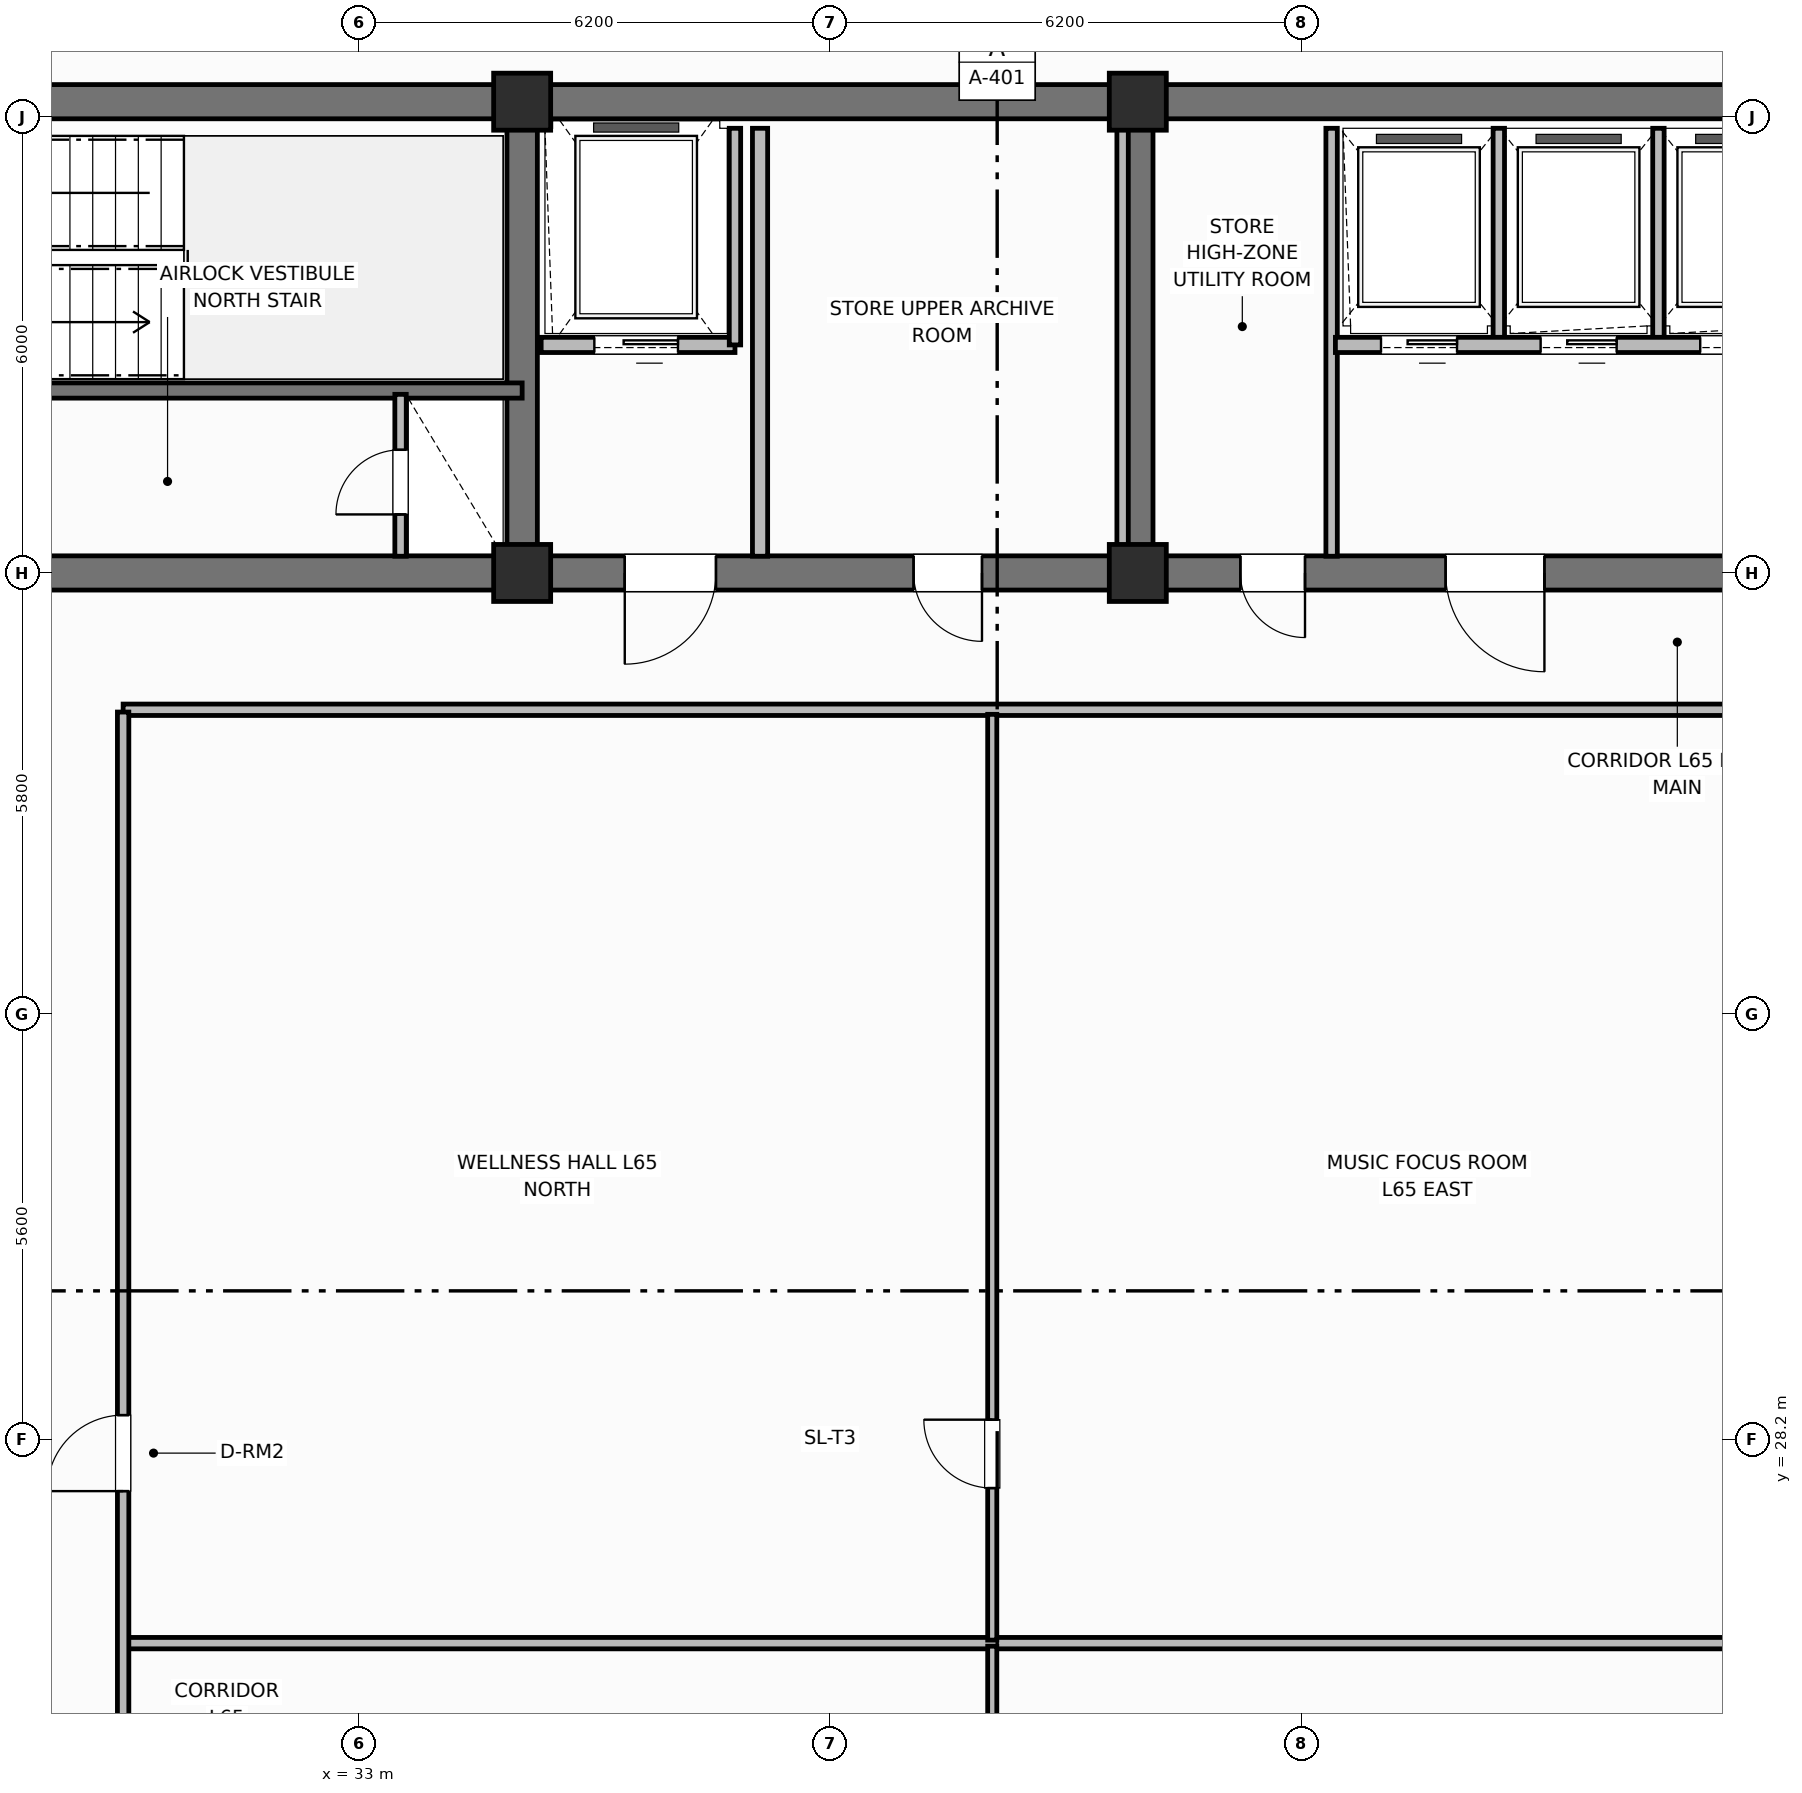
"""IFC4 building model, lengths in metres.
Left out: names, types, materials, properties, quantities, classifications, styles, units other than length and angle.
Written with IfcOpenShell. Run it as: python <this file> out.ifc"""

import sys

from ifc_helpers import new_model, si_unit, direction, frame, frame_2d, origin, origin_2d, place, context, subcontext, project, spatial, rectangle, extrude, element, fill, save


model = new_model("IFC4")
c1 = context("Model", 3, precision=1e-05, world=origin(), true_north=direction((0.0, 1.0)))
c2 = subcontext(c1, "Body", "Model", "MODEL_VIEW")
j1 = project(units=[si_unit("LENGTHUNIT", "METRE"), si_unit("PLANEANGLEUNIT", "RADIAN")], contexts=[c1])
p1 = place(None, origin())
s1 = spatial("IfcSite", under=j1, at=p1, CompositionType="ELEMENT")
p2 = place(p1, origin())
s2 = spatial("IfcBuilding", under=s1, at=p2, CompositionType="ELEMENT")
p3 = place(p2, frame((0.0, 0.0, 260.2)))
s3 = spatial("IfcBuildingStorey", under=s2, at=p3, CompositionType="ELEMENT", Elevation=260.2)
p4 = place(p3, frame((25.6, 45.8, 0.0), z_axis=(0.0, 0.0, 1.0), x_axis=(1.0, 0.0, 0.0)))
e1 = element("IfcWall", 1, at=p4, inside=s3, PredefinedType="SHEAR", context=c2, shape_type="SweptSolid", body=[
    extrude(rectangle(XDim=27.2, YDim=0.45, at=frame_2d((13.6, 0.0))), origin(), (0.0, 0.0, 1.0), 3.7),
])
p5 = place(p3, frame((52.8, 39.6, 0.0), z_axis=(0.0, 0.0, 1.0), x_axis=(-1.0, 0.0, 0.0)))
e2 = element("IfcWall", 2, at=p5, inside=s3, PredefinedType="SHEAR", context=c2, shape_type="SweptSolid", body=[
    extrude(rectangle(XDim=27.2, YDim=0.45, at=frame_2d((13.6, 0.0))), origin(), (0.0, 0.0, 1.0), 3.7),
])
p6 = place(p5, frame((24.2, 0.0, 0.0)))
e3 = element("IfcOpeningElement", 3, at=p6, cuts=e2, PredefinedType="OPENING", context=c2, shape_type="SweptSolid", body=[
    extrude(rectangle(XDim=1.1, YDim=2.15, at=frame_2d((0.55, 1.075))), frame((0.0, 0.235, 0.0), z_axis=(0.0, -1.0, 0.0), x_axis=(1.0, 0.0, 0.0)), (0.0, 0.0, 1.0), 0.47),
])
p7 = place(p5, frame((15.1, 0.0, 0.0)))
e4 = element("IfcOpeningElement", 4, at=p7, cuts=e2, PredefinedType="OPENING", context=c2, shape_type="SweptSolid", body=[
    extrude(rectangle(XDim=1.2, YDim=2.15, at=frame_2d((0.6, 1.075))), frame((0.0, 0.235, 0.0), z_axis=(0.0, -1.0, 0.0), x_axis=(1.0, 0.0, 0.0)), (0.0, 0.0, 1.0), 0.47),
])
p8 = place(p5, frame((11.6, 0.0, 0.0)))
e5 = element("IfcOpeningElement", 5, at=p8, cuts=e2, PredefinedType="OPENING", context=c2, shape_type="SweptSolid", body=[
    extrude(rectangle(XDim=0.9, YDim=2.1, at=frame_2d((0.45, 1.05))), frame((0.0, 0.235, 0.0), z_axis=(0.0, -1.0, 0.0), x_axis=(1.0, 0.0, 0.0)), (0.0, 0.0, 1.0), 0.47),
])
p9 = place(p5, frame((7.35, 0.0, 0.0)))
e6 = element("IfcOpeningElement", 6, at=p9, cuts=e2, PredefinedType="OPENING", context=c2, shape_type="SweptSolid", body=[
    extrude(rectangle(XDim=0.85, YDim=2.1, at=frame_2d((0.425, 1.05))), frame((0.0, 0.235, 0.0), z_axis=(0.0, -1.0, 0.0), x_axis=(1.0, 0.0, 0.0)), (0.0, 0.0, 1.0), 0.47),
])
p10 = place(p5, frame((4.2, 0.0, 0.0)))
e7 = element("IfcOpeningElement", 7, at=p10, cuts=e2, PredefinedType="OPENING", context=c2, shape_type="SweptSolid", body=[
    extrude(rectangle(XDim=1.3, YDim=2.2, at=frame_2d((0.65, 1.1))), frame((0.0, 0.235, 0.0), z_axis=(0.0, -1.0, 0.0), x_axis=(1.0, 0.0, 0.0)), (0.0, 0.0, 1.0), 0.47),
])
for number, where, z_axis, x_axis in (
    (8, (35.15, 39.825, 0.0), (0.0, 0.0, 1.0), (0.0, 1.0, 0.0)),
    (9, (43.25, 39.825, 0.0), (0.0, 0.0, 1.0), (0.0, 1.0, 0.0)),
):
    element("IfcWall", number, at=place(p3, frame(where, z_axis=z_axis, x_axis=x_axis)), inside=s3, PredefinedType="SHEAR", context=c2, shape_type="SweptSolid", body=[
        extrude(rectangle(XDim=5.75, YDim=0.4, at=frame_2d((2.875, 0.0))), origin(), (0.0, 0.0, 1.0), 3.7),
    ])
for number, where, z_axis, x_axis in (
    (10, (35.15, 39.6, 0.0), (0.0, 0.0, 1.0), (1.0, 0.0, 0.0)),
    (11, (35.15, 45.8, 0.0), (0.0, 0.0, 1.0), (1.0, 0.0, 0.0)),
    (12, (43.25, 39.6, 0.0), (0.0, 0.0, 1.0), (1.0, 0.0, 0.0)),
    (13, (43.25, 45.8, 0.0), (0.0, 0.0, 1.0), (1.0, 0.0, 0.0)),
):
    element("IfcColumn", number, at=place(p3, frame(where, z_axis=z_axis, x_axis=x_axis)), inside=s3, PredefinedType="COLUMN", context=c2, shape_type="SweptSolid", body=[
        extrude(rectangle(XDim=0.75, YDim=0.75, at=origin_2d()), origin(), (0.0, 0.0, 1.0), 3.7),
    ])
p11 = place(p3, frame((35.15, 42.0, 0.0), z_axis=(0.0, 0.0, 1.0), x_axis=(-1.0, 0.0, 0.0)))
e14 = element("IfcWall", 14, at=p11, inside=s3, PredefinedType="SHEAR", context=c2, shape_type="SweptSolid", body=[
    extrude(rectangle(XDim=9.55, YDim=0.2, at=frame_2d((4.775, 0.0))), origin(), (0.0, 0.0, 1.0), 3.7),
])
p12 = place(p11, frame((7.25, 0.0, 0.0)))
e15 = element("IfcOpeningElement", 15, at=p12, cuts=e14, PredefinedType="OPENING", context=c2, shape_type="SweptSolid", body=[
    extrude(rectangle(XDim=1.1, YDim=2.15, at=frame_2d((0.55, 1.075))), frame((0.0, 0.11, 0.0), z_axis=(0.0, -1.0, 0.0), x_axis=(1.0, 0.0, 0.0)), (0.0, 0.0, 1.0), 0.22),
])
p13 = place(p3, frame((33.55, 39.82, 0.0), z_axis=(0.0, 0.0, 1.0), x_axis=(0.0, 1.0, 0.0)))
e16 = element("IfcWall", 16, at=p13, inside=s3, PredefinedType="PARTITIONING", context=c2, shape_type="SweptSolid", body=[
    extrude(rectangle(XDim=2.13, YDim=0.15, at=frame_2d((1.065, 0.0))), origin(), (0.0, 0.0, 1.0), 2.56),
])
p14 = place(p13, frame((0.55, 0.0, 0.0)))
e17 = element("IfcOpeningElement", 17, at=p14, cuts=e16, PredefinedType="OPENING", context=c2, shape_type="SweptSolid", body=[
    extrude(rectangle(XDim=0.85, YDim=2.05, at=frame_2d((0.425, 1.025))), frame((0.0, 0.085, 0.0), z_axis=(0.0, -1.0, 0.0), x_axis=(1.0, 0.0, 0.0)), (0.0, 0.0, 1.0), 0.17),
])
p15 = place(p3, frame((37.95, 42.6, 0.0), z_axis=(0.0, 0.0, 1.0), x_axis=(-1.0, 0.0, 0.0)))
e18 = element("IfcWall", 18, at=p15, inside=s3, PredefinedType="PARTITIONING", context=c2, shape_type="SweptSolid", body=[
    extrude(rectangle(XDim=2.55, YDim=0.2, at=frame_2d((1.275, 0.0))), origin(), (0.0, 0.0, 1.0), 2.33),
])
p16 = place(p15, frame((0.75, 0.0, 0.0)))
e19 = element("IfcOpeningElement", 19, at=p16, cuts=e18, PredefinedType="OPENING", context=c2, shape_type="SweptSolid", body=[
    extrude(rectangle(XDim=1.1, YDim=2.15, at=frame_2d((0.55, 1.075))), frame((0.0, 0.11, 0.0), z_axis=(0.0, -1.0, 0.0), x_axis=(1.0, 0.0, 0.0)), (0.0, 0.0, 1.0), 0.22),
])
p17 = place(p3, frame((37.95, 42.6, 0.0), z_axis=(0.0, 0.0, 1.0), x_axis=(0.0, 1.0, 0.0)))
e20 = element("IfcWall", 20, at=p17, inside=s3, PredefinedType="PARTITIONING", context=c2, shape_type="SweptSolid", body=[
    extrude(rectangle(XDim=2.85, YDim=0.15, at=frame_2d((1.425, 0.0))), origin(), (0.0, 0.0, 1.0), 2.56),
])
p18 = place(p3, frame((38.28, 39.82, 0.0), z_axis=(0.0, 0.0, 1.0), x_axis=(0.0, 1.0, 0.0)))
e21 = element("IfcWall", 21, at=p18, inside=s3, PredefinedType="PARTITIONING", context=c2, shape_type="SweptSolid", body=[
    extrude(rectangle(XDim=5.63, YDim=0.2, at=frame_2d((2.815, 0.0))), origin(), (0.0, 0.0, 1.0), 2.56),
])
for number, where, z_axis, x_axis in (
    (22, (43.05, 39.82, 0.0), (0.0, 0.0, 1.0), (0.0, 1.0, 0.0)),
    (23, (45.8, 39.82, 0.0), (0.0, 0.0, 1.0), (0.0, 1.0, 0.0)),
):
    element("IfcWall", number, at=place(p3, frame(where, z_axis=z_axis, x_axis=x_axis)), inside=s3, PredefinedType="PARTITIONING", context=c2, shape_type="SweptSolid", body=[
        extrude(rectangle(XDim=5.63, YDim=0.15, at=frame_2d((2.815, 0.0))), origin(), (0.0, 0.0, 1.0), 2.56),
    ])
for number, where, z_axis, x_axis in (
    (24, (48.0, 42.65, 0.0), (0.0, 0.0, 1.0), (0.0, 1.0, 0.0)),
    (25, (50.1, 42.65, 0.0), (0.0, 0.0, 1.0), (0.0, 1.0, 0.0)),
):
    element("IfcWall", number, at=place(p3, frame(where, z_axis=z_axis, x_axis=x_axis)), inside=s3, PredefinedType="PARTITIONING", context=c2, shape_type="SweptSolid", body=[
        extrude(rectangle(XDim=2.8, YDim=0.15, at=frame_2d((1.4, 0.0))), origin(), (0.0, 0.0, 1.0), 2.56),
    ])
p19 = place(p3, frame((52.35, 42.6, 0.0), z_axis=(0.0, 0.0, 1.0), x_axis=(-1.0, 0.0, 0.0)))
e26 = element("IfcWall", 26, at=p19, inside=s3, PredefinedType="PARTITIONING", context=c2, shape_type="SweptSolid", body=[
    extrude(rectangle(XDim=6.5, YDim=0.2, at=frame_2d((3.25, 0.0))), origin(), (0.0, 0.0, 1.0), 2.56),
])
p20 = place(p19, frame((4.9, 0.0, 0.0)))
e27 = element("IfcOpeningElement", 27, at=p20, cuts=e26, PredefinedType="OPENING", context=c2, shape_type="SweptSolid", body=[
    extrude(rectangle(XDim=1.0, YDim=2.15, at=frame_2d((0.5, 1.075))), frame((0.0, 0.11, 0.0), z_axis=(0.0, -1.0, 0.0), x_axis=(1.0, 0.0, 0.0)), (0.0, 0.0, 1.0), 0.22),
])
p21 = place(p19, frame((2.8, 0.0, 0.0)))
e28 = element("IfcOpeningElement", 28, at=p21, cuts=e26, PredefinedType="OPENING", context=c2, shape_type="SweptSolid", body=[
    extrude(rectangle(XDim=1.0, YDim=2.15, at=frame_2d((0.5, 1.075))), frame((0.0, 0.11, 0.0), z_axis=(0.0, -1.0, 0.0), x_axis=(1.0, 0.0, 0.0)), (0.0, 0.0, 1.0), 0.22),
])
p22 = place(p19, frame((0.7, 0.0, 0.0)))
e29 = element("IfcOpeningElement", 29, at=p22, cuts=e26, PredefinedType="OPENING", context=c2, shape_type="SweptSolid", body=[
    extrude(rectangle(XDim=1.0, YDim=2.15, at=frame_2d((0.5, 1.075))), frame((0.0, 0.11, 0.0), z_axis=(0.0, -1.0, 0.0), x_axis=(1.0, 0.0, 0.0)), (0.0, 0.0, 1.0), 0.22),
])
p23 = place(p3, frame((29.9, 37.8, 0.0), z_axis=(0.0, 0.0, 1.0), x_axis=(1.0, 0.0, 0.0)))
e30 = element("IfcWall", 30, at=p23, inside=s3, PredefinedType="PARTITIONING", context=c2, shape_type="SweptSolid", body=[
    extrude(rectangle(XDim=22.95, YDim=0.15, at=frame_2d((11.475, 0.0))), origin(), (0.0, 0.0, 1.0), 2.56),
])
p24 = place(p3, frame((29.93, 25.521, 0.0), z_axis=(0.0, 0.0, 1.0), x_axis=(1.0, 0.0, 0.0)))
e31 = element("IfcWall", 31, at=p24, inside=s3, PredefinedType="PARTITIONING", context=c2, shape_type="SweptSolid", body=[
    extrude(rectangle(XDim=22.87, YDim=0.15, at=frame_2d((11.435, 0.0))), origin(), (0.0, 0.0, 1.0), 2.56),
])
p25 = place(p3, frame((41.335, 18.66, 0.0), z_axis=(0.0, 0.0, 1.0), x_axis=(0.0, 1.0, 0.0)))
e32 = element("IfcWall", 32, at=p25, inside=s3, PredefinedType="PARTITIONING", context=c2, shape_type="SweptSolid", body=[
    extrude(rectangle(XDim=6.821, YDim=0.12, at=frame_2d((3.41, 0.0))), origin(), (0.0, 0.0, 1.0), 2.56),
])
p26 = place(p25, frame((2.0, 0.0, 0.0)))
e33 = element("IfcOpeningElement", 33, at=p26, cuts=e32, PredefinedType="OPENING", context=c2, shape_type="SweptSolid", body=[
    extrude(rectangle(XDim=0.9, YDim=2.1, at=frame_2d((0.45, 1.05))), frame((0.0, 0.07, 0.0), z_axis=(0.0, -1.0, 0.0), x_axis=(1.0, 0.0, 0.0)), (0.0, 0.0, 1.0), 0.14),
])
p27 = place(p3, frame((41.335, 25.56, 0.0), z_axis=(0.0, 0.0, 1.0), x_axis=(0.0, 1.0, 0.0)))
e34 = element("IfcWall", 34, at=p27, inside=s3, PredefinedType="PARTITIONING", context=c2, shape_type="SweptSolid", body=[
    extrude(rectangle(XDim=12.18, YDim=0.12, at=frame_2d((6.09, 0.0))), origin(), (0.0, 0.0, 1.0), 2.56),
])
p28 = place(p27, frame((2.0, 0.0, 0.0)))
e35 = element("IfcOpeningElement", 35, at=p28, cuts=e34, PredefinedType="OPENING", context=c2, shape_type="SweptSolid", body=[
    extrude(rectangle(XDim=0.9, YDim=2.1, at=frame_2d((0.45, 1.05))), frame((0.0, 0.07, 0.0), z_axis=(0.0, -1.0, 0.0), x_axis=(1.0, 0.0, 0.0)), (0.0, 0.0, 1.0), 0.14),
])
p29 = place(p3, frame((29.9, 18.63, 0.0), z_axis=(0.0, 0.0, 1.0), x_axis=(0.0, 1.0, 0.0)))
e36 = element("IfcWall", 36, at=p29, inside=s3, PredefinedType="PARTITIONING", context=c2, shape_type="SweptSolid", body=[
    extrude(rectangle(XDim=19.14, YDim=0.15, at=frame_2d((9.57, 0.0))), origin(), (0.0, 0.0, 1.0), 2.56),
])
p30 = place(p29, frame((2.2, 0.0, 0.0)))
e37 = element("IfcOpeningElement", 37, at=p30, cuts=e36, PredefinedType="OPENING", context=c2, shape_type="SweptSolid", body=[
    extrude(rectangle(XDim=1.0, YDim=2.15, at=frame_2d((0.5, 1.075))), frame((0.0, 0.085, 0.0), z_axis=(0.0, -1.0, 0.0), x_axis=(1.0, 0.0, 0.0)), (0.0, 0.0, 1.0), 0.17),
])
p31 = place(p29, frame((8.89, 0.0, 0.0)))
e38 = element("IfcOpeningElement", 38, at=p31, cuts=e36, PredefinedType="OPENING", context=c2, shape_type="SweptSolid", body=[
    extrude(rectangle(XDim=1.0, YDim=2.15, at=frame_2d((0.5, 1.075))), frame((0.0, 0.085, 0.0), z_axis=(0.0, -1.0, 0.0), x_axis=(1.0, 0.0, 0.0)), (0.0, 0.0, 1.0), 0.17),
])
p32 = place(p14, origin())
e39 = element("IfcDoor", 39, at=p32, inside=s3, OperationType="SINGLE_SWING_LEFT", PredefinedType="TRAPDOOR", context=c2, shape_type="SweptSolid", body=[
    extrude(rectangle(XDim=0.85, YDim=2.05, at=frame_2d((0.425, 1.025))), frame((0.0, 0.025, 0.0), z_axis=(0.0, -1.0, 0.0), x_axis=(1.0, 0.0, 0.0)), (0.0, 0.0, 1.0), 0.05),
])
fill(e17, e39)
p33 = place(p16, origin())
e40 = element("IfcDoor", 40, at=p33, inside=s3, OperationType="SLIDING_TO_LEFT", PredefinedType="DOOR", context=c2, shape_type="SweptSolid", body=[
    extrude(rectangle(XDim=1.1, YDim=2.15, at=frame_2d((0.55, 1.075))), frame((0.0, 0.025, 0.0), z_axis=(0.0, -1.0, 0.0), x_axis=(1.0, 0.0, 0.0)), (0.0, 0.0, 1.0), 0.05),
])
fill(e19, e40)
p34 = place(p20, origin())
e41 = element("IfcDoor", 41, at=p34, inside=s3, OperationType="SLIDING_TO_LEFT", PredefinedType="DOOR", context=c2, shape_type="SweptSolid", body=[
    extrude(rectangle(XDim=1.0, YDim=2.15, at=frame_2d((0.5, 1.075))), frame((0.0, 0.025, 0.0), z_axis=(0.0, -1.0, 0.0), x_axis=(1.0, 0.0, 0.0)), (0.0, 0.0, 1.0), 0.05),
])
fill(e27, e41)
p35 = place(p21, origin())
e42 = element("IfcDoor", 42, at=p35, inside=s3, OperationType="SLIDING_TO_LEFT", PredefinedType="DOOR", context=c2, shape_type="SweptSolid", body=[
    extrude(rectangle(XDim=1.0, YDim=2.15, at=frame_2d((0.5, 1.075))), frame((0.0, 0.025, 0.0), z_axis=(0.0, -1.0, 0.0), x_axis=(1.0, 0.0, 0.0)), (0.0, 0.0, 1.0), 0.05),
])
fill(e28, e42)
p36 = place(p22, origin())
e43 = element("IfcDoor", 43, at=p36, inside=s3, OperationType="SLIDING_TO_LEFT", PredefinedType="DOOR", context=c2, shape_type="SweptSolid", body=[
    extrude(rectangle(XDim=1.0, YDim=2.15, at=frame_2d((0.5, 1.075))), frame((0.0, 0.025, 0.0), z_axis=(0.0, -1.0, 0.0), x_axis=(1.0, 0.0, 0.0)), (0.0, 0.0, 1.0), 0.05),
])
fill(e29, e43)
p37 = place(p28, origin())
e44 = element("IfcDoor", 44, at=p37, inside=s3, OperationType="SINGLE_SWING_RIGHT", PredefinedType="DOOR", context=c2, shape_type="SweptSolid", body=[
    extrude(rectangle(XDim=0.9, YDim=2.1, at=frame_2d((0.45, 1.05))), frame((0.0, 0.025, 0.0), z_axis=(0.0, -1.0, 0.0), x_axis=(1.0, 0.0, 0.0)), (0.0, 0.0, 1.0), 0.05),
])
fill(e35, e44)
p38 = place(p31, origin())
e45 = element("IfcDoor", 45, at=p38, inside=s3, OperationType="SINGLE_SWING_LEFT", PredefinedType="DOOR", context=c2, shape_type="SweptSolid", body=[
    extrude(rectangle(XDim=1.0, YDim=2.15, at=frame_2d((0.5, 1.075))), frame((0.0, 0.025, 0.0), z_axis=(0.0, -1.0, 0.0), x_axis=(1.0, 0.0, 0.0)), (0.0, 0.0, 1.0), 0.05),
])
fill(e38, e45)
p39 = place(p7, origin())
e46 = element("IfcDoor", 46, at=p39, inside=s3, OperationType="SINGLE_SWING_RIGHT", PredefinedType="DOOR", context=c2, shape_type="SweptSolid", body=[
    extrude(rectangle(XDim=1.2, YDim=2.15, at=frame_2d((0.6, 1.075))), frame((0.0, 0.025, 0.0), z_axis=(0.0, -1.0, 0.0), x_axis=(1.0, 0.0, 0.0)), (0.0, 0.0, 1.0), 0.05),
])
fill(e4, e46)
p40 = place(p8, origin())
e47 = element("IfcDoor", 47, at=p40, inside=s3, OperationType="SINGLE_SWING_LEFT", PredefinedType="DOOR", context=c2, shape_type="SweptSolid", body=[
    extrude(rectangle(XDim=0.9, YDim=2.1, at=frame_2d((0.45, 1.05))), frame((0.0, 0.025, 0.0), z_axis=(0.0, -1.0, 0.0), x_axis=(1.0, 0.0, 0.0)), (0.0, 0.0, 1.0), 0.05),
])
fill(e5, e47)
p41 = place(p9, origin())
e48 = element("IfcDoor", 48, at=p41, inside=s3, OperationType="SINGLE_SWING_LEFT", PredefinedType="DOOR", context=c2, shape_type="SweptSolid", body=[
    extrude(rectangle(XDim=0.85, YDim=2.1, at=frame_2d((0.425, 1.05))), frame((0.0, 0.025, 0.0), z_axis=(0.0, -1.0, 0.0), x_axis=(1.0, 0.0, 0.0)), (0.0, 0.0, 1.0), 0.05),
])
fill(e6, e48)
p42 = place(p10, origin())
e49 = element("IfcDoor", 49, at=p42, inside=s3, OperationType="SINGLE_SWING_LEFT", PredefinedType="DOOR", context=c2, shape_type="SweptSolid", body=[
    extrude(rectangle(XDim=1.3, YDim=2.2, at=frame_2d((0.65, 1.1))), frame((0.0, 0.025, 0.0), z_axis=(0.0, -1.0, 0.0), x_axis=(1.0, 0.0, 0.0)), (0.0, 0.0, 1.0), 0.05),
])
fill(e7, e49)
save(model, sys.argv[1])
